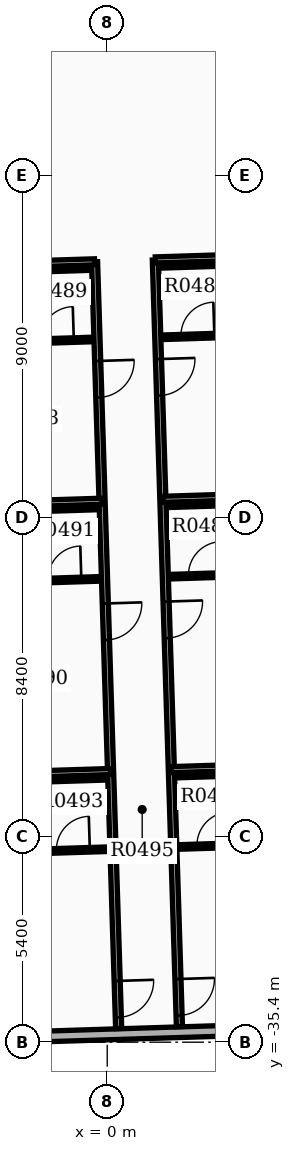
"""IFC4 building model, lengths in metres.
Left out: names, types, materials, properties, quantities, classifications, styles, units other than length and angle.
Written with IfcOpenShell. Run it as: python <this file> out.ifc"""

import sys

from ifc_helpers import new_model, si_unit, direction, frame, frame_2d, origin, place, context, subcontext, project, spatial, rectangle, extrude, element, fill, save


model = new_model("IFC4")
c1 = context("Model", 3, precision=1e-05, world=origin(), true_north=direction((0.0, 1.0)))
c2 = subcontext(c1, "Body", "Model", "MODEL_VIEW")
j1 = project(units=[si_unit("LENGTHUNIT", "METRE"), si_unit("PLANEANGLEUNIT", "RADIAN")], contexts=[c1])
p1 = place(None, origin())
s1 = spatial("IfcSite", under=j1, at=p1, CompositionType="ELEMENT")
p2 = place(p1, origin())
s2 = spatial("IfcBuilding", under=s1, at=p2, CompositionType="ELEMENT")
p3 = place(p2, frame((0.0, 0.0, 31.5)))
s3 = spatial("IfcBuildingStorey", under=s2, at=p3, CompositionType="ELEMENT", Elevation=31.5)
p4 = place(p3, frame((-5.752, -35.378, 0.0), z_axis=(0.0, 0.0, 1.0), x_axis=(0.999506679556, 0.031406966164, 0.0)))
e1 = element("IfcWall", 1, at=p4, inside=s3, PredefinedType="STANDARD", context=c2, shape_type="SweptSolid", body=[
    extrude(rectangle(XDim=13.72, YDim=0.28, at=frame_2d((6.86, 0.0))), origin(), (0.0, 0.0, 1.0), 2.91),
])
p5 = place(p4, frame((0.85, 0.0, 0.85)))
e2 = element("IfcOpeningElement", 2, at=p5, cuts=e1, PredefinedType="OPENING", context=c2, shape_type="SweptSolid", body=[
    extrude(rectangle(XDim=1.0, YDim=1.5, at=frame_2d((0.5, 0.75))), frame((0.0, 0.15, 0.0), z_axis=(0.0, -1.0, 0.0), x_axis=(1.0, 0.0, 0.0)), (0.0, 0.0, 1.0), 0.3),
])
p6 = place(p3, frame((1.266, -14.817, 0.0), z_axis=(0.0, 0.0, 1.0), x_axis=(0.031403565719, -0.9995067864, 0.0)))
e3 = element("IfcWall", 3, at=p6, inside=s3, PredefinedType="PARTITIONING", context=c2, shape_type="SweptSolid", body=[
    extrude(rectangle(XDim=20.182, YDim=0.16, at=frame_2d((10.091, 0.0))), origin(), (0.0, 0.0, 1.0), 2.9),
])
p7 = place(p6, frame((2.61, 0.0, 0.0)))
e4 = element("IfcOpeningElement", 4, at=p7, cuts=e3, PredefinedType="OPENING", context=c2, shape_type="SweptSolid", body=[
    extrude(rectangle(XDim=0.96, YDim=2.15, at=frame_2d((0.48, 1.075))), frame((0.0, 0.09, 0.0), z_axis=(0.0, -1.0, 0.0), x_axis=(1.0, 0.0, 0.0)), (0.0, 0.0, 1.0), 0.18),
])
p8 = place(p6, frame((8.994, 0.0, 0.0)))
e5 = element("IfcOpeningElement", 5, at=p8, cuts=e3, PredefinedType="OPENING", context=c2, shape_type="SweptSolid", body=[
    extrude(rectangle(XDim=0.96, YDim=2.15, at=frame_2d((0.48, 1.075))), frame((0.0, 0.09, 0.0), z_axis=(0.0, -1.0, 0.0), x_axis=(1.0, 0.0, 0.0)), (0.0, 0.0, 1.0), 0.18),
])
p9 = place(p6, frame((18.93, 0.0, 0.0)))
e6 = element("IfcOpeningElement", 6, at=p9, cuts=e3, PredefinedType="OPENING", context=c2, shape_type="SweptSolid", body=[
    extrude(rectangle(XDim=0.96, YDim=2.15, at=frame_2d((0.48, 1.075))), frame((0.0, 0.09, 0.0), z_axis=(0.0, -1.0, 0.0), x_axis=(1.0, 0.0, 0.0)), (0.0, 0.0, 1.0), 0.18),
])
p10 = place(p3, frame((1.266, -14.817, 0.0), z_axis=(0.0, 0.0, 1.0), x_axis=(0.999507397699, 0.031384103385, 0.0)))
e7 = element("IfcWall", 7, at=p10, inside=s3, PredefinedType="PARTITIONING", context=c2, shape_type="SweptSolid", body=[
    extrude(rectangle(XDim=5.92, YDim=0.16, at=frame_2d((2.96, 0.0))), origin(), (0.0, 0.0, 1.0), 2.9),
])
p11 = place(p3, frame((1.464, -21.116, 0.0), z_axis=(0.0, 0.0, 1.0), x_axis=(0.999506032581, 0.031427548972, 0.0)))
e8 = element("IfcWall", 8, at=p11, inside=s3, PredefinedType="PARTITIONING", context=c2, shape_type="SweptSolid", body=[
    extrude(rectangle(XDim=5.772, YDim=0.16, at=frame_2d((2.886, 0.0))), origin(), (0.0, 0.0, 1.0), 2.9),
])
p12 = place(p3, frame((1.47, -16.852, 0.0), z_axis=(0.0, 0.0, 1.0), x_axis=(0.999507221803, 0.031389704724, 0.0)))
e9 = element("IfcWall", 9, at=p12, inside=s3, PredefinedType="PARTITIONING", context=c2, shape_type="SweptSolid", body=[
    extrude(rectangle(XDim=1.82, YDim=0.12, at=frame_2d((0.91, 0.0))), origin(), (0.0, 0.0, 1.0), 2.9),
])
p13 = place(p12, frame((0.47, 0.0, 0.0)))
e10 = element("IfcOpeningElement", 10, at=p13, cuts=e9, PredefinedType="OPENING", context=c2, shape_type="SweptSolid", body=[
    extrude(rectangle(XDim=0.88, YDim=2.1, at=frame_2d((0.44, 1.05))), frame((0.0, 0.07, 0.0), z_axis=(0.0, -1.0, 0.0), x_axis=(1.0, 0.0, 0.0)), (0.0, 0.0, 1.0), 0.14),
])
p14 = place(p3, frame((1.411, -14.973, 0.0), z_axis=(0.0, 0.0, 1.0), x_axis=(0.999507221803, 0.031389704724, 0.0)))
e11 = element("IfcWall", 11, at=p14, inside=s3, PredefinedType="PARTITIONING", context=c2, shape_type="SweptSolid", body=[
    extrude(rectangle(XDim=1.82, YDim=0.12, at=frame_2d((0.91, 0.0))), origin(), (0.0, 0.0, 1.0), 2.9),
])
p15 = place(p3, frame((1.688, -28.229, 0.0), z_axis=(0.0, 0.0, 1.0), x_axis=(0.999506074356, 0.031426220357, 0.0)))
e12 = element("IfcWall", 12, at=p15, inside=s3, PredefinedType="PARTITIONING", context=c2, shape_type="SweptSolid", body=[
    extrude(rectangle(XDim=5.772, YDim=0.16, at=frame_2d((2.886, 0.0))), origin(), (0.0, 0.0, 1.0), 2.9),
])
p16 = place(p3, frame((1.668, -23.151, 0.0), z_axis=(0.0, 0.0, 1.0), x_axis=(0.999511421504, 0.031255692016, 0.0)))
e13 = element("IfcWall", 13, at=p16, inside=s3, PredefinedType="PARTITIONING", context=c2, shape_type="SweptSolid", body=[
    extrude(rectangle(XDim=1.82, YDim=0.12, at=frame_2d((0.91, 0.0))), origin(), (0.0, 0.0, 1.0), 2.9),
])
p17 = place(p16, frame((0.47, 0.0, 0.0)))
e14 = element("IfcOpeningElement", 14, at=p17, cuts=e13, PredefinedType="OPENING", context=c2, shape_type="SweptSolid", body=[
    extrude(rectangle(XDim=0.88, YDim=2.1, at=frame_2d((0.44, 1.05))), frame((0.0, 0.07, 0.0), z_axis=(0.0, -1.0, 0.0), x_axis=(1.0, 0.0, 0.0)), (0.0, 0.0, 1.0), 0.14),
])
p18 = place(p3, frame((1.609, -21.272, 0.0), z_axis=(0.0, 0.0, 1.0), x_axis=(0.999507221803, 0.031389704724, 0.0)))
e15 = element("IfcWall", 15, at=p18, inside=s3, PredefinedType="PARTITIONING", context=c2, shape_type="SweptSolid", body=[
    extrude(rectangle(XDim=1.82, YDim=0.12, at=frame_2d((0.91, 0.0))), origin(), (0.0, 0.0, 1.0), 2.9),
])
p19 = place(p3, frame((1.892, -30.263, 0.0), z_axis=(0.0, 0.0, 1.0), x_axis=(0.999507221803, 0.031389704724, 0.0)))
e16 = element("IfcWall", 16, at=p19, inside=s3, PredefinedType="PARTITIONING", context=c2, shape_type="SweptSolid", body=[
    extrude(rectangle(XDim=1.82, YDim=0.12, at=frame_2d((0.91, 0.0))), origin(), (0.0, 0.0, 1.0), 2.9),
])
p20 = place(p19, frame((0.47, 0.0, 0.0)))
e17 = element("IfcOpeningElement", 17, at=p20, cuts=e16, PredefinedType="OPENING", context=c2, shape_type="SweptSolid", body=[
    extrude(rectangle(XDim=0.88, YDim=2.1, at=frame_2d((0.44, 1.05))), frame((0.0, 0.07, 0.0), z_axis=(0.0, -1.0, 0.0), x_axis=(1.0, 0.0, 0.0)), (0.0, 0.0, 1.0), 0.14),
])
p21 = place(p3, frame((1.833, -28.385, 0.0), z_axis=(0.0, 0.0, 1.0), x_axis=(0.999507221803, 0.031389704724, 0.0)))
e18 = element("IfcWall", 18, at=p21, inside=s3, PredefinedType="PARTITIONING", context=c2, shape_type="SweptSolid", body=[
    extrude(rectangle(XDim=1.82, YDim=0.12, at=frame_2d((0.91, 0.0))), origin(), (0.0, 0.0, 1.0), 2.9),
])
p22 = place(p3, frame((-0.333, -14.868, 0.0), z_axis=(0.0, 0.0, 1.0), x_axis=(0.031416030536, -0.99950639469, 0.0)))
e19 = element("IfcWall", 19, at=p22, inside=s3, PredefinedType="PARTITIONING", context=c2, shape_type="SweptSolid", body=[
    extrude(rectangle(XDim=20.182, YDim=0.16, at=frame_2d((10.091, 0.0))), origin(), (0.0, 0.0, 1.0), 2.9),
])
p23 = place(p22, frame((2.61, 0.0, 0.0)))
e20 = element("IfcOpeningElement", 20, at=p23, cuts=e19, PredefinedType="OPENING", context=c2, shape_type="SweptSolid", body=[
    extrude(rectangle(XDim=0.96, YDim=2.15, at=frame_2d((0.48, 1.075))), frame((0.0, 0.09, 0.0), z_axis=(0.0, -1.0, 0.0), x_axis=(1.0, 0.0, 0.0)), (0.0, 0.0, 1.0), 0.18),
])
p24 = place(p22, frame((8.994, 0.0, 0.0)))
e21 = element("IfcOpeningElement", 21, at=p24, cuts=e19, PredefinedType="OPENING", context=c2, shape_type="SweptSolid", body=[
    extrude(rectangle(XDim=0.96, YDim=2.15, at=frame_2d((0.48, 1.075))), frame((0.0, 0.09, 0.0), z_axis=(0.0, -1.0, 0.0), x_axis=(1.0, 0.0, 0.0)), (0.0, 0.0, 1.0), 0.18),
])
p25 = place(p22, frame((18.93, 0.0, 0.0)))
e22 = element("IfcOpeningElement", 22, at=p25, cuts=e19, PredefinedType="OPENING", context=c2, shape_type="SweptSolid", body=[
    extrude(rectangle(XDim=0.96, YDim=2.15, at=frame_2d((0.48, 1.075))), frame((0.0, 0.09, 0.0), z_axis=(0.0, -1.0, 0.0), x_axis=(1.0, 0.0, 0.0)), (0.0, 0.0, 1.0), 0.18),
])
p26 = place(p3, frame((-0.333, -14.868, 0.0), z_axis=(0.0, 0.0, 1.0), x_axis=(-0.999507397699, -0.031384103385, 0.0)))
e23 = element("IfcWall", 23, at=p26, inside=s3, PredefinedType="PARTITIONING", context=c2, shape_type="SweptSolid", body=[
    extrude(rectangle(XDim=5.92, YDim=0.16, at=frame_2d((2.96, 0.0))), origin(), (0.0, 0.0, 1.0), 2.9),
])
p27 = place(p3, frame((-0.135, -21.167, 0.0), z_axis=(0.0, 0.0, 1.0), x_axis=(-0.999507360361, -0.031385292484, 0.0)))
e24 = element("IfcWall", 24, at=p27, inside=s3, PredefinedType="PARTITIONING", context=c2, shape_type="SweptSolid", body=[
    extrude(rectangle(XDim=5.772, YDim=0.16, at=frame_2d((2.886, 0.0))), origin(), (0.0, 0.0, 1.0), 2.9),
])
p28 = place(p3, frame((-2.228, -16.969, 0.0), z_axis=(0.0, 0.0, 1.0), x_axis=(0.999503004171, 0.03152371574, 0.0)))
e25 = element("IfcWall", 25, at=p28, inside=s3, PredefinedType="PARTITIONING", context=c2, shape_type="SweptSolid", body=[
    extrude(rectangle(XDim=1.82, YDim=0.12, at=frame_2d((0.91, 0.0))), origin(), (0.0, 0.0, 1.0), 2.9),
])
p29 = place(p28, frame((0.47, 0.0, 0.0)))
e26 = element("IfcOpeningElement", 26, at=p29, cuts=e25, PredefinedType="OPENING", context=c2, shape_type="SweptSolid", body=[
    extrude(rectangle(XDim=0.88, YDim=2.1, at=frame_2d((0.44, 1.05))), frame((0.0, 0.07, 0.0), z_axis=(0.0, -1.0, 0.0), x_axis=(1.0, 0.0, 0.0)), (0.0, 0.0, 1.0), 0.14),
])
p30 = place(p3, frame((-2.287, -15.089, 0.0), z_axis=(0.0, 0.0, 1.0), x_axis=(0.999503004171, 0.03152371574, 0.0)))
e27 = element("IfcWall", 27, at=p30, inside=s3, PredefinedType="PARTITIONING", context=c2, shape_type="SweptSolid", body=[
    extrude(rectangle(XDim=1.82, YDim=0.12, at=frame_2d((0.91, 0.0))), origin(), (0.0, 0.0, 1.0), 2.9),
])
p31 = place(p3, frame((0.088, -28.279, 0.0), z_axis=(0.0, 0.0, 1.0), x_axis=(-0.999507402024, -0.031383965651, 0.0)))
e28 = element("IfcWall", 28, at=p31, inside=s3, PredefinedType="PARTITIONING", context=c2, shape_type="SweptSolid", body=[
    extrude(rectangle(XDim=5.772, YDim=0.16, at=frame_2d((2.886, 0.0))), origin(), (0.0, 0.0, 1.0), 2.9),
])
p32 = place(p3, frame((-2.03, -23.267, 0.0), z_axis=(0.0, 0.0, 1.0), x_axis=(0.999511421504, 0.031255692016, 0.0)))
e29 = element("IfcWall", 29, at=p32, inside=s3, PredefinedType="PARTITIONING", context=c2, shape_type="SweptSolid", body=[
    extrude(rectangle(XDim=1.82, YDim=0.12, at=frame_2d((0.91, 0.0))), origin(), (0.0, 0.0, 1.0), 2.9),
])
p33 = place(p32, frame((0.47, 0.0, 0.0)))
e30 = element("IfcOpeningElement", 30, at=p33, cuts=e29, PredefinedType="OPENING", context=c2, shape_type="SweptSolid", body=[
    extrude(rectangle(XDim=0.88, YDim=2.1, at=frame_2d((0.44, 1.05))), frame((0.0, 0.07, 0.0), z_axis=(0.0, -1.0, 0.0), x_axis=(1.0, 0.0, 0.0)), (0.0, 0.0, 1.0), 0.14),
])
p34 = place(p3, frame((-2.089, -21.388, 0.0), z_axis=(0.0, 0.0, 1.0), x_axis=(0.999507221803, 0.031389704724, 0.0)))
e31 = element("IfcWall", 31, at=p34, inside=s3, PredefinedType="PARTITIONING", context=c2, shape_type="SweptSolid", body=[
    extrude(rectangle(XDim=1.82, YDim=0.12, at=frame_2d((0.91, 0.0))), origin(), (0.0, 0.0, 1.0), 2.9),
])
p35 = place(p3, frame((-1.807, -30.38, 0.0), z_axis=(0.0, 0.0, 1.0), x_axis=(0.999507221803, 0.031389704724, 0.0)))
e32 = element("IfcWall", 32, at=p35, inside=s3, PredefinedType="PARTITIONING", context=c2, shape_type="SweptSolid", body=[
    extrude(rectangle(XDim=1.82, YDim=0.12, at=frame_2d((0.91, 0.0))), origin(), (0.0, 0.0, 1.0), 2.9),
])
p36 = place(p35, frame((0.47, 0.0, 0.0)))
e33 = element("IfcOpeningElement", 33, at=p36, cuts=e32, PredefinedType="OPENING", context=c2, shape_type="SweptSolid", body=[
    extrude(rectangle(XDim=0.88, YDim=2.1, at=frame_2d((0.44, 1.05))), frame((0.0, 0.07, 0.0), z_axis=(0.0, -1.0, 0.0), x_axis=(1.0, 0.0, 0.0)), (0.0, 0.0, 1.0), 0.14),
])
p37 = place(p3, frame((-1.866, -28.501, 0.0), z_axis=(0.0, 0.0, 1.0), x_axis=(0.999507221803, 0.031389704724, 0.0)))
e34 = element("IfcWall", 34, at=p37, inside=s3, PredefinedType="PARTITIONING", context=c2, shape_type="SweptSolid", body=[
    extrude(rectangle(XDim=1.82, YDim=0.12, at=frame_2d((0.91, 0.0))), origin(), (0.0, 0.0, 1.0), 2.9),
])
p38 = place(p7, origin())
e35 = element("IfcDoor", 35, at=p38, inside=s3, OperationType="SINGLE_SWING_LEFT", PredefinedType="DOOR", context=c2, shape_type="SweptSolid", body=[
    extrude(rectangle(XDim=0.96, YDim=2.15, at=frame_2d((0.48, 1.075))), frame((0.0, 0.025, 0.0), z_axis=(0.0, -1.0, 0.0), x_axis=(1.0, 0.0, 0.0)), (0.0, 0.0, 1.0), 0.05),
])
fill(e4, e35)
p39 = place(p13, origin())
e36 = element("IfcDoor", 36, at=p39, inside=s3, OperationType="SINGLE_SWING_RIGHT", PredefinedType="DOOR", context=c2, shape_type="SweptSolid", body=[
    extrude(rectangle(XDim=0.88, YDim=2.1, at=frame_2d((0.44, 1.05))), frame((0.0, 0.025, 0.0), z_axis=(0.0, -1.0, 0.0), x_axis=(1.0, 0.0, 0.0)), (0.0, 0.0, 1.0), 0.05),
])
fill(e10, e36)
p40 = place(p8, origin())
e37 = element("IfcDoor", 37, at=p40, inside=s3, OperationType="SINGLE_SWING_LEFT", PredefinedType="DOOR", context=c2, shape_type="SweptSolid", body=[
    extrude(rectangle(XDim=0.96, YDim=2.15, at=frame_2d((0.48, 1.075))), frame((0.0, 0.025, 0.0), z_axis=(0.0, -1.0, 0.0), x_axis=(1.0, 0.0, 0.0)), (0.0, 0.0, 1.0), 0.05),
])
fill(e5, e37)
p41 = place(p17, origin())
e38 = element("IfcDoor", 38, at=p41, inside=s3, OperationType="SINGLE_SWING_RIGHT", PredefinedType="DOOR", context=c2, shape_type="SweptSolid", body=[
    extrude(rectangle(XDim=0.88, YDim=2.1, at=frame_2d((0.44, 1.05))), frame((0.0, 0.025, 0.0), z_axis=(0.0, -1.0, 0.0), x_axis=(1.0, 0.0, 0.0)), (0.0, 0.0, 1.0), 0.05),
])
fill(e14, e38)
p42 = place(p9, origin())
e39 = element("IfcDoor", 39, at=p42, inside=s3, OperationType="SINGLE_SWING_LEFT", PredefinedType="DOOR", context=c2, shape_type="SweptSolid", body=[
    extrude(rectangle(XDim=0.96, YDim=2.15, at=frame_2d((0.48, 1.075))), frame((0.0, 0.025, 0.0), z_axis=(0.0, -1.0, 0.0), x_axis=(1.0, 0.0, 0.0)), (0.0, 0.0, 1.0), 0.05),
])
fill(e6, e39)
p43 = place(p20, origin())
e40 = element("IfcDoor", 40, at=p43, inside=s3, OperationType="SINGLE_SWING_RIGHT", PredefinedType="DOOR", context=c2, shape_type="SweptSolid", body=[
    extrude(rectangle(XDim=0.88, YDim=2.1, at=frame_2d((0.44, 1.05))), frame((0.0, 0.025, 0.0), z_axis=(0.0, -1.0, 0.0), x_axis=(1.0, 0.0, 0.0)), (0.0, 0.0, 1.0), 0.05),
])
fill(e17, e40)
p44 = place(p23, origin())
e41 = element("IfcDoor", 41, at=p44, inside=s3, OperationType="SINGLE_SWING_LEFT", PredefinedType="DOOR", context=c2, shape_type="SweptSolid", body=[
    extrude(rectangle(XDim=0.96, YDim=2.15, at=frame_2d((0.48, 1.075))), frame((0.0, 0.025, 0.0), z_axis=(0.0, -1.0, 0.0), x_axis=(1.0, 0.0, 0.0)), (0.0, 0.0, 1.0), 0.05),
])
fill(e20, e41)
p45 = place(p29, origin())
e42 = element("IfcDoor", 42, at=p45, inside=s3, OperationType="SINGLE_SWING_RIGHT", PredefinedType="DOOR", context=c2, shape_type="SweptSolid", body=[
    extrude(rectangle(XDim=0.88, YDim=2.1, at=frame_2d((0.44, 1.05))), frame((0.0, 0.025, 0.0), z_axis=(0.0, -1.0, 0.0), x_axis=(1.0, 0.0, 0.0)), (0.0, 0.0, 1.0), 0.05),
])
fill(e26, e42)
p46 = place(p24, origin())
e43 = element("IfcDoor", 43, at=p46, inside=s3, OperationType="SINGLE_SWING_LEFT", PredefinedType="DOOR", context=c2, shape_type="SweptSolid", body=[
    extrude(rectangle(XDim=0.96, YDim=2.15, at=frame_2d((0.48, 1.075))), frame((0.0, 0.025, 0.0), z_axis=(0.0, -1.0, 0.0), x_axis=(1.0, 0.0, 0.0)), (0.0, 0.0, 1.0), 0.05),
])
fill(e21, e43)
p47 = place(p33, origin())
e44 = element("IfcDoor", 44, at=p47, inside=s3, OperationType="SINGLE_SWING_RIGHT", PredefinedType="DOOR", context=c2, shape_type="SweptSolid", body=[
    extrude(rectangle(XDim=0.88, YDim=2.1, at=frame_2d((0.44, 1.05))), frame((0.0, 0.025, 0.0), z_axis=(0.0, -1.0, 0.0), x_axis=(1.0, 0.0, 0.0)), (0.0, 0.0, 1.0), 0.05),
])
fill(e30, e44)
p48 = place(p25, origin())
e45 = element("IfcDoor", 45, at=p48, inside=s3, OperationType="SINGLE_SWING_LEFT", PredefinedType="DOOR", context=c2, shape_type="SweptSolid", body=[
    extrude(rectangle(XDim=0.96, YDim=2.15, at=frame_2d((0.48, 1.075))), frame((0.0, 0.025, 0.0), z_axis=(0.0, -1.0, 0.0), x_axis=(1.0, 0.0, 0.0)), (0.0, 0.0, 1.0), 0.05),
])
fill(e22, e45)
p49 = place(p36, origin())
e46 = element("IfcDoor", 46, at=p49, inside=s3, OperationType="SINGLE_SWING_RIGHT", PredefinedType="DOOR", context=c2, shape_type="SweptSolid", body=[
    extrude(rectangle(XDim=0.88, YDim=2.1, at=frame_2d((0.44, 1.05))), frame((0.0, 0.025, 0.0), z_axis=(0.0, -1.0, 0.0), x_axis=(1.0, 0.0, 0.0)), (0.0, 0.0, 1.0), 0.05),
])
fill(e33, e46)
save(model, sys.argv[1])
